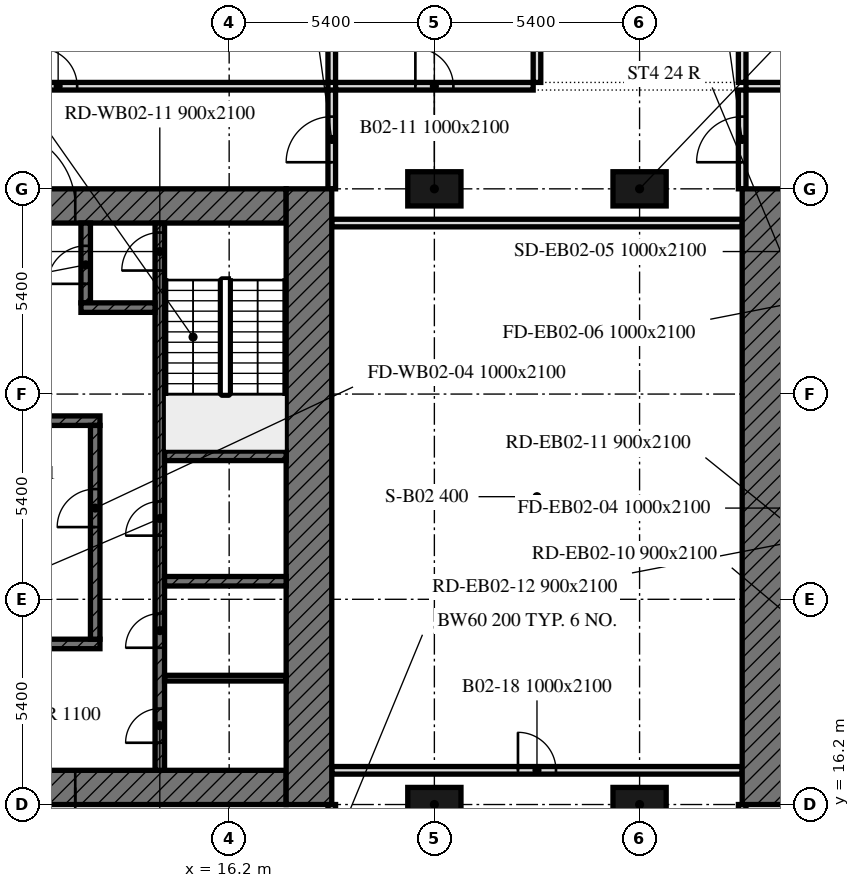
"""IFC4 building model, lengths in metres.
Left out: names, types, materials, properties, quantities, classifications, styles, units other than length and angle.
Written with IfcOpenShell. Run it as: python <this file> out.ifc"""

import sys

from ifc_helpers import new_model, si_unit, direction, frame, frame_2d, origin, origin_2d, place, context, subcontext, project, spatial, rectangle, extrude, element, fill, save


model = new_model("IFC4")
c1 = context("Model", 3, precision=1e-05, world=origin(), true_north=direction((0.0, 1.0)))
c2 = subcontext(c1, "Body", "Model", "MODEL_VIEW")
j1 = project(units=[si_unit("LENGTHUNIT", "METRE"), si_unit("PLANEANGLEUNIT", "RADIAN")], contexts=[c1])
p1 = place(None, origin())
s1 = spatial("IfcSite", under=j1, at=p1, CompositionType="ELEMENT")
p2 = place(p1, origin())
s2 = spatial("IfcBuilding", under=s1, at=p2, CompositionType="ELEMENT")
p3 = place(p2, frame((0.0, 0.0, -9.0)))
s3 = spatial("IfcBuildingStorey", under=s2, at=p3, CompositionType="ELEMENT", Elevation=-9.0)
for number, where, z_axis, x_axis in (
    (1, (21.6, 16.2, 0.0), (0.0, 0.0, 1.0), (1.0, 0.0, 0.0)),
    (2, (27.0, 16.2, 0.0), (0.0, 0.0, 1.0), (1.0, 0.0, 0.0)),
    (3, (21.6, 32.4, 0.0), (0.0, 0.0, 1.0), (1.0, 0.0, 0.0)),
    (4, (27.0, 32.4, 0.0), (0.0, 0.0, 1.0), (1.0, 0.0, 0.0)),
):
    element("IfcColumn", number, at=place(p3, frame(where, z_axis=z_axis, x_axis=x_axis)), inside=s3, PredefinedType="COLUMN", context=c2, shape_type="SweptSolid", body=[
        extrude(rectangle(XDim=1.4, YDim=0.9, at=origin_2d()), origin(), (0.0, 0.0, 1.0), 4.1),
    ])
for number, where, z_axis, x_axis in (
    (5, (18.9, 35.2, 0.0), (0.0, 0.0, 1.0), (0.0, 1.0, 0.0)),
    (6, (24.3, 35.2, 0.0), (0.0, 0.0, 1.0), (0.0, 1.0, 0.0)),
    (7, (29.7, 35.2, 0.0), (0.0, 0.0, 1.0), (0.0, 1.0, 0.0)),
):
    element("IfcWall", number, at=place(p3, frame(where, z_axis=z_axis, x_axis=x_axis)), inside=s3, PredefinedType="PARTITIONING", context=c2, shape_type="SweptSolid", body=[
        extrude(rectangle(XDim=8.8, YDim=0.2, at=frame_2d((4.4, 0.0))), origin(), (0.0, 0.0, 1.0), 4.1),
    ])
p4 = place(p3, frame((4.6, 35.1, 0.0), z_axis=(0.0, 0.0, 1.0), x_axis=(1.0, 0.0, 0.0)))
e8 = element("IfcWall", 8, at=p4, inside=s3, PredefinedType="PARTITIONING", context=c2, shape_type="SweptSolid", body=[
    extrude(rectangle(XDim=14.2, YDim=0.2, at=frame_2d((7.1, 0.0))), origin(), (0.0, 0.0, 1.0), 4.1),
])
p5 = place(p4, frame((6.6, 0.0, 0.0)))
e9 = element("IfcOpeningElement", 9, at=p5, cuts=e8, PredefinedType="OPENING", context=c2, shape_type="SweptSolid", body=[
    extrude(rectangle(XDim=1.0, YDim=2.1, at=frame_2d((0.5, 1.05))), frame((0.0, 0.11, 0.0), z_axis=(0.0, -1.0, 0.0), x_axis=(1.0, 0.0, 0.0)), (0.0, 0.0, 1.0), 0.22),
])
p6 = place(p3, frame((19.0, 35.1, 0.0), z_axis=(0.0, 0.0, 1.0), x_axis=(1.0, 0.0, 0.0)))
e10 = element("IfcWall", 10, at=p6, inside=s3, PredefinedType="PARTITIONING", context=c2, shape_type="SweptSolid", body=[
    extrude(rectangle(XDim=5.2, YDim=0.2, at=frame_2d((2.6, 0.0))), origin(), (0.0, 0.0, 1.0), 4.1),
])
p7 = place(p6, frame((2.1, 0.0, 0.0)))
e11 = element("IfcOpeningElement", 11, at=p7, cuts=e10, PredefinedType="OPENING", context=c2, shape_type="SweptSolid", body=[
    extrude(rectangle(XDim=1.0, YDim=2.1, at=frame_2d((0.5, 1.05))), frame((0.0, 0.11, 0.0), z_axis=(0.0, -1.0, 0.0), x_axis=(1.0, 0.0, 0.0)), (0.0, 0.0, 1.0), 0.22),
])
p8 = place(p3, frame((29.8, 35.1, 0.0), z_axis=(0.0, 0.0, 1.0), x_axis=(1.0, 0.0, 0.0)))
e12 = element("IfcWall", 12, at=p8, inside=s3, PredefinedType="PARTITIONING", context=c2, shape_type="SweptSolid", body=[
    extrude(rectangle(XDim=5.2, YDim=0.2, at=frame_2d((2.6, 0.0))), origin(), (0.0, 0.0, 1.0), 4.1),
])
p9 = place(p8, frame((2.1, 0.0, 0.0)))
e13 = element("IfcOpeningElement", 13, at=p9, cuts=e12, PredefinedType="OPENING", context=c2, shape_type="SweptSolid", body=[
    extrude(rectangle(XDim=1.0, YDim=2.1, at=frame_2d((0.5, 1.05))), frame((0.0, 0.11, 0.0), z_axis=(0.0, -1.0, 0.0), x_axis=(1.0, 0.0, 0.0)), (0.0, 0.0, 1.0), 0.22),
])
p10 = place(p3, frame((18.9, 13.6, 0.0), z_axis=(0.0, 0.0, 1.0), x_axis=(0.0, 1.0, 0.0)))
e14 = element("IfcWall", 14, at=p10, inside=s3, PredefinedType="PARTITIONING", context=c2, shape_type="SweptSolid", body=[
    extrude(rectangle(XDim=2.6, YDim=0.2, at=frame_2d((1.3, 0.0))), origin(), (0.0, 0.0, 1.0), 4.1),
])
p11 = place(p10, frame((0.7, 0.0, 0.0)))
e15 = element("IfcOpeningElement", 15, at=p11, cuts=e14, PredefinedType="OPENING", context=c2, shape_type="SweptSolid", body=[
    extrude(rectangle(XDim=1.2, YDim=2.1, at=frame_2d((0.6, 1.05))), frame((0.0, 0.11, 0.0), z_axis=(0.0, -1.0, 0.0), x_axis=(1.0, 0.0, 0.0)), (0.0, 0.0, 1.0), 0.22),
])
p12 = place(p3, frame((18.9, 32.4, 0.0), z_axis=(0.0, 0.0, 1.0), x_axis=(0.0, 1.0, 0.0)))
e16 = element("IfcWall", 16, at=p12, inside=s3, PredefinedType="PARTITIONING", context=c2, shape_type="SweptSolid", body=[
    extrude(rectangle(XDim=2.6, YDim=0.2, at=frame_2d((1.3, 0.0))), origin(), (0.0, 0.0, 1.0), 4.1),
])
p13 = place(p12, frame((0.7, 0.0, 0.0)))
e17 = element("IfcOpeningElement", 17, at=p13, cuts=e16, PredefinedType="OPENING", context=c2, shape_type="SweptSolid", body=[
    extrude(rectangle(XDim=1.2, YDim=2.1, at=frame_2d((0.6, 1.05))), frame((0.0, 0.11, 0.0), z_axis=(0.0, -1.0, 0.0), x_axis=(1.0, 0.0, 0.0)), (0.0, 0.0, 1.0), 0.22),
])
p14 = place(p3, frame((29.7, 13.6, 0.0), z_axis=(0.0, 0.0, 1.0), x_axis=(0.0, 1.0, 0.0)))
e18 = element("IfcWall", 18, at=p14, inside=s3, PredefinedType="PARTITIONING", context=c2, shape_type="SweptSolid", body=[
    extrude(rectangle(XDim=2.6, YDim=0.2, at=frame_2d((1.3, 0.0))), origin(), (0.0, 0.0, 1.0), 4.1),
])
p15 = place(p14, frame((0.7, 0.0, 0.0)))
e19 = element("IfcOpeningElement", 19, at=p15, cuts=e18, PredefinedType="OPENING", context=c2, shape_type="SweptSolid", body=[
    extrude(rectangle(XDim=1.2, YDim=2.1, at=frame_2d((0.6, 1.05))), frame((0.0, 0.11, 0.0), z_axis=(0.0, -1.0, 0.0), x_axis=(1.0, 0.0, 0.0)), (0.0, 0.0, 1.0), 0.22),
])
p16 = place(p3, frame((29.7, 32.4, 0.0), z_axis=(0.0, 0.0, 1.0), x_axis=(0.0, 1.0, 0.0)))
e20 = element("IfcWall", 20, at=p16, inside=s3, PredefinedType="PARTITIONING", context=c2, shape_type="SweptSolid", body=[
    extrude(rectangle(XDim=2.6, YDim=0.2, at=frame_2d((1.3, 0.0))), origin(), (0.0, 0.0, 1.0), 4.1),
])
p17 = place(p16, frame((0.7, 0.0, 0.0)))
e21 = element("IfcOpeningElement", 21, at=p17, cuts=e20, PredefinedType="OPENING", context=c2, shape_type="SweptSolid", body=[
    extrude(rectangle(XDim=1.2, YDim=2.1, at=frame_2d((0.6, 1.05))), frame((0.0, 0.11, 0.0), z_axis=(0.0, -1.0, 0.0), x_axis=(1.0, 0.0, 0.0)), (0.0, 0.0, 1.0), 0.22),
])
p18 = place(p3, frame((18.9, 17.1, 0.0), z_axis=(0.0, 0.0, 1.0), x_axis=(1.0, 0.0, 0.0)))
e22 = element("IfcWall", 22, at=p18, inside=s3, PredefinedType="PARTITIONING", context=c2, shape_type="SweptSolid", body=[
    extrude(rectangle(XDim=10.8, YDim=0.2, at=frame_2d((5.4, 0.0))), origin(), (0.0, 0.0, 1.0), 4.1),
])
p19 = place(p18, frame((4.9, 0.0, 0.0)))
e23 = element("IfcOpeningElement", 23, at=p19, cuts=e22, PredefinedType="OPENING", context=c2, shape_type="SweptSolid", body=[
    extrude(rectangle(XDim=1.0, YDim=2.1, at=frame_2d((0.5, 1.05))), frame((0.0, 0.11, 0.0), z_axis=(0.0, -1.0, 0.0), x_axis=(1.0, 0.0, 0.0)), (0.0, 0.0, 1.0), 0.22),
])
p20 = place(p3, frame((18.9, 31.5, 0.0), z_axis=(0.0, 0.0, 1.0), x_axis=(1.0, 0.0, 0.0)))
e24 = element("IfcWall", 24, at=p20, inside=s3, PredefinedType="PARTITIONING", context=c2, shape_type="SweptSolid", body=[
    extrude(rectangle(XDim=10.8, YDim=0.2, at=frame_2d((5.4, 0.0))), origin(), (0.0, 0.0, 1.0), 4.1),
])
p21 = place(p3, frame((17.7, 16.65, 0.0), z_axis=(0.0, 0.0, 1.0), x_axis=(-1.0, 0.0, 0.0)))
e25 = element("IfcWall", 25, at=p21, inside=s3, PredefinedType="SOLIDWALL", context=c2, shape_type="SweptSolid", body=[
    extrude(rectangle(XDim=11.1, YDim=0.9, at=frame_2d((5.55, 0.0))), origin(), (0.0, 0.0, 1.0), 4.1),
])
p22 = place(p21, frame((5.55, 0.0, 0.0)))
e26 = element("IfcOpeningElement", 26, at=p22, cuts=e25, PredefinedType="OPENING", context=c2, shape_type="SweptSolid", body=[
    extrude(rectangle(XDim=2.0, YDim=2.4, at=frame_2d((1.0, 1.2))), frame((0.0, 0.45, 0.0), z_axis=(0.0, -1.0, 0.0), x_axis=(1.0, 0.0, 0.0)), (0.0, 0.0, 1.0), 0.9),
])
p23 = place(p3, frame((6.6, 31.95, 0.0), z_axis=(0.0, 0.0, 1.0), x_axis=(1.0, 0.0, 0.0)))
e27 = element("IfcWall", 27, at=p23, inside=s3, PredefinedType="SOLIDWALL", context=c2, shape_type="SweptSolid", body=[
    extrude(rectangle(XDim=11.1, YDim=0.9, at=frame_2d((5.55, 0.0))), origin(), (0.0, 0.0, 1.0), 4.1),
])
p24 = place(p23, frame((3.55, 0.0, 0.0)))
e28 = element("IfcOpeningElement", 28, at=p24, cuts=e27, PredefinedType="OPENING", context=c2, shape_type="SweptSolid", body=[
    extrude(rectangle(XDim=2.0, YDim=2.4, at=frame_2d((1.0, 1.2))), frame((0.0, 0.45, 0.0), z_axis=(0.0, -1.0, 0.0), x_axis=(1.0, 0.0, 0.0)), (0.0, 0.0, 1.0), 0.9),
])
p25 = place(p3, frame((18.3, 32.4, 0.0), z_axis=(0.0, 0.0, 1.0), x_axis=(0.0, -1.0, 0.0)))
e29 = element("IfcWall", 29, at=p25, inside=s3, PredefinedType="SOLIDWALL", context=c2, shape_type="SweptSolid", body=[
    extrude(rectangle(XDim=16.2, YDim=1.2, at=frame_2d((8.1, 0.0))), origin(), (0.0, 0.0, 1.0), 4.1),
])
p26 = place(p3, frame((14.375, 17.1, 0.0), z_axis=(0.0, 0.0, 1.0), x_axis=(0.0, 1.0, 0.0)))
e30 = element("IfcWall", 30, at=p26, inside=s3, PredefinedType="SOLIDWALL", context=c2, shape_type="SweptSolid", body=[
    extrude(rectangle(XDim=14.4, YDim=0.25, at=frame_2d((7.2, 0.0))), origin(), (0.0, 0.0, 1.0), 4.1),
])
p27 = place(p26, frame((13.15, 0.0, 0.0)))
e31 = element("IfcOpeningElement", 31, at=p27, cuts=e30, PredefinedType="OPENING", context=c2, shape_type="SweptSolid", body=[
    extrude(rectangle(XDim=1.0, YDim=2.1, at=frame_2d((0.5, 1.05))), frame((0.0, 0.125, 0.0), z_axis=(0.0, -1.0, 0.0), x_axis=(1.0, 0.0, 0.0)), (0.0, 0.0, 1.0), 0.25),
])
p28 = place(p26, frame((0.725, 0.0, 0.0)))
e32 = element("IfcOpeningElement", 32, at=p28, cuts=e30, PredefinedType="OPENING", context=c2, shape_type="SweptSolid", body=[
    extrude(rectangle(XDim=0.9, YDim=2.1, at=frame_2d((0.45, 1.05))), frame((0.0, 0.125, 0.0), z_axis=(0.0, -1.0, 0.0), x_axis=(1.0, 0.0, 0.0)), (0.0, 0.0, 1.0), 0.25),
])
p29 = place(p26, frame((3.225, 0.0, 0.0)))
e33 = element("IfcOpeningElement", 33, at=p29, cuts=e30, PredefinedType="OPENING", context=c2, shape_type="SweptSolid", body=[
    extrude(rectangle(XDim=0.9, YDim=2.1, at=frame_2d((0.45, 1.05))), frame((0.0, 0.125, 0.0), z_axis=(0.0, -1.0, 0.0), x_axis=(1.0, 0.0, 0.0)), (0.0, 0.0, 1.0), 0.25),
])
p30 = place(p26, frame((6.175, 0.0, 0.0)))
e34 = element("IfcOpeningElement", 34, at=p30, cuts=e30, PredefinedType="OPENING", context=c2, shape_type="SweptSolid", body=[
    extrude(rectangle(XDim=0.9, YDim=2.1, at=frame_2d((0.45, 1.05))), frame((0.0, 0.125, 0.0), z_axis=(0.0, -1.0, 0.0), x_axis=(1.0, 0.0, 0.0)), (0.0, 0.0, 1.0), 0.25),
])
for number, where, z_axis, x_axis in (
    (35, (14.5, 25.375, 0.0), (0.0, 0.0, 1.0), (1.0, 0.0, 0.0)),
    (36, (14.5, 22.075, 0.0), (0.0, 0.0, 1.0), (1.0, 0.0, 0.0)),
):
    element("IfcWall", number, at=place(p3, frame(where, z_axis=z_axis, x_axis=x_axis)), inside=s3, PredefinedType="SOLIDWALL", context=c2, shape_type="SweptSolid", body=[
        extrude(rectangle(XDim=3.2, YDim=0.25, at=frame_2d((1.6, 0.0))), origin(), (0.0, 0.0, 1.0), 4.1),
    ])
for number, where, z_axis, x_axis in (
    (37, (10.05, 26.3, 0.0), (0.0, 0.0, 1.0), (1.0, 0.0, 0.0)),
    (38, (10.05, 20.425, 0.0), (0.0, 0.0, 1.0), (1.0, 0.0, 0.0)),
):
    element("IfcWall", number, at=place(p3, frame(where, z_axis=z_axis, x_axis=x_axis)), inside=s3, PredefinedType="SOLIDWALL", context=c2, shape_type="SweptSolid", body=[
        extrude(rectangle(XDim=2.75, YDim=0.25, at=frame_2d((1.375, 0.0))), origin(), (0.0, 0.0, 1.0), 4.1),
    ])
p31 = place(p3, frame((12.425, 29.4, 0.0), z_axis=(0.0, 0.0, 1.0), x_axis=(0.0, 1.0, 0.0)))
e39 = element("IfcWall", 39, at=p31, inside=s3, PredefinedType="SOLIDWALL", context=c2, shape_type="SweptSolid", body=[
    extrude(rectangle(XDim=2.1, YDim=0.25, at=frame_2d((1.05, 0.0))), origin(), (0.0, 0.0, 1.0), 4.1),
])
p32 = place(p31, frame((0.5, 0.0, 0.0)))
e40 = element("IfcOpeningElement", 40, at=p32, cuts=e39, PredefinedType="OPENING", context=c2, shape_type="SweptSolid", body=[
    extrude(rectangle(XDim=1.0, YDim=2.1, at=frame_2d((0.5, 1.05))), frame((0.0, 0.125, 0.0), z_axis=(0.0, -1.0, 0.0), x_axis=(1.0, 0.0, 0.0)), (0.0, 0.0, 1.0), 0.25),
])
p33 = place(p3, frame((12.3, 29.275, 0.0), z_axis=(0.0, 0.0, 1.0), x_axis=(1.0, 0.0, 0.0)))
e41 = element("IfcWall", 41, at=p33, inside=s3, PredefinedType="SOLIDWALL", context=c2, shape_type="SweptSolid", body=[
    extrude(rectangle(XDim=1.95, YDim=0.25, at=frame_2d((0.975, 0.0))), origin(), (0.0, 0.0, 1.0), 4.1),
])
p34 = place(p3, frame((12.675, 20.55, 0.0), z_axis=(0.0, 0.0, 1.0), x_axis=(0.0, 1.0, 0.0)))
e42 = element("IfcWall", 42, at=p34, inside=s3, PredefinedType="SOLIDWALL", context=c2, shape_type="SweptSolid", body=[
    extrude(rectangle(XDim=5.625, YDim=0.25, at=frame_2d((2.812, 0.0))), origin(), (0.0, 0.0, 1.0), 4.1),
])
p35 = place(p34, frame((2.95, 0.0, 0.0)))
e43 = element("IfcOpeningElement", 43, at=p35, cuts=e42, PredefinedType="OPENING", context=c2, shape_type="SweptSolid", body=[
    extrude(rectangle(XDim=1.0, YDim=2.1, at=frame_2d((0.5, 1.05))), frame((0.0, 0.125, 0.0), z_axis=(0.0, -1.0, 0.0), x_axis=(1.0, 0.0, 0.0)), (0.0, 0.0, 1.0), 0.25),
])
p36 = place(p3, frame((14.5, 19.525, 0.0), z_axis=(0.0, 0.0, 1.0), x_axis=(1.0, 0.0, 0.0)))
e44 = element("IfcWall", 44, at=p36, inside=s3, PredefinedType="PARTITIONING", context=c2, shape_type="SweptSolid", body=[
    extrude(rectangle(XDim=3.2, YDim=0.15, at=frame_2d((1.6, 0.0))), origin(), (0.0, 0.0, 1.0), 4.1),
])
p37 = place(p3, frame((30.3, 16.2, 0.0), z_axis=(0.0, 0.0, 1.0), x_axis=(0.0, 1.0, 0.0)))
e45 = element("IfcWall", 45, at=p37, inside=s3, PredefinedType="SOLIDWALL", context=c2, shape_type="SweptSolid", body=[
    extrude(rectangle(XDim=16.2, YDim=1.2, at=frame_2d((8.1, 0.0))), origin(), (0.0, 0.0, 1.0), 4.1),
])
p38 = place(p5, origin())
e46 = element("IfcDoor", 46, at=p38, inside=s3, OperationType="SINGLE_SWING_LEFT", PredefinedType="DOOR", context=c2, shape_type="SweptSolid", body=[
    extrude(rectangle(XDim=1.0, YDim=2.1, at=frame_2d((0.5, 1.05))), frame((0.0, 0.025, 0.0), z_axis=(0.0, -1.0, 0.0), x_axis=(1.0, 0.0, 0.0)), (0.0, 0.0, 1.0), 0.05),
])
fill(e9, e46)
p39 = place(p7, origin())
e47 = element("IfcDoor", 47, at=p39, inside=s3, OperationType="SINGLE_SWING_LEFT", PredefinedType="DOOR", context=c2, shape_type="SweptSolid", body=[
    extrude(rectangle(XDim=1.0, YDim=2.1, at=frame_2d((0.5, 1.05))), frame((0.0, 0.025, 0.0), z_axis=(0.0, -1.0, 0.0), x_axis=(1.0, 0.0, 0.0)), (0.0, 0.0, 1.0), 0.05),
])
fill(e11, e47)
p40 = place(p13, origin())
e48 = element("IfcDoor", 48, at=p40, inside=s3, OperationType="SINGLE_SWING_LEFT", PredefinedType="DOOR", context=c2, shape_type="SweptSolid", body=[
    extrude(rectangle(XDim=1.2, YDim=2.1, at=frame_2d((0.6, 1.05))), frame((0.0, 0.025, 0.0), z_axis=(0.0, -1.0, 0.0), x_axis=(1.0, 0.0, 0.0)), (0.0, 0.0, 1.0), 0.05),
])
fill(e17, e48)
p41 = place(p17, origin())
e49 = element("IfcDoor", 49, at=p41, inside=s3, OperationType="SINGLE_SWING_LEFT", PredefinedType="DOOR", context=c2, shape_type="SweptSolid", body=[
    extrude(rectangle(XDim=1.2, YDim=2.1, at=frame_2d((0.6, 1.05))), frame((0.0, 0.025, 0.0), z_axis=(0.0, -1.0, 0.0), x_axis=(1.0, 0.0, 0.0)), (0.0, 0.0, 1.0), 0.05),
])
fill(e21, e49)
p42 = place(p19, origin())
e50 = element("IfcDoor", 50, at=p42, inside=s3, OperationType="SINGLE_SWING_LEFT", PredefinedType="DOOR", context=c2, shape_type="SweptSolid", body=[
    extrude(rectangle(XDim=1.0, YDim=2.1, at=frame_2d((0.5, 1.05))), frame((0.0, 0.025, 0.0), z_axis=(0.0, -1.0, 0.0), x_axis=(1.0, 0.0, 0.0)), (0.0, 0.0, 1.0), 0.05),
])
fill(e23, e50)
p43 = place(p22, origin())
e51 = element("IfcDoor", 51, at=p43, inside=s3, OperationType="DOUBLE_DOOR_SINGLE_SWING", PredefinedType="DOOR", context=c2, shape_type="SweptSolid", body=[
    extrude(rectangle(XDim=2.0, YDim=2.4, at=frame_2d((1.0, 1.2))), frame((0.0, 0.025, 0.0), z_axis=(0.0, -1.0, 0.0), x_axis=(1.0, 0.0, 0.0)), (0.0, 0.0, 1.0), 0.05),
])
fill(e26, e51)
p44 = place(p24, origin())
e52 = element("IfcDoor", 52, at=p44, inside=s3, OperationType="DOUBLE_DOOR_SINGLE_SWING", PredefinedType="DOOR", context=c2, shape_type="SweptSolid", body=[
    extrude(rectangle(XDim=2.0, YDim=2.4, at=frame_2d((1.0, 1.2))), frame((0.0, 0.025, 0.0), z_axis=(0.0, -1.0, 0.0), x_axis=(1.0, 0.0, 0.0)), (0.0, 0.0, 1.0), 0.05),
])
fill(e28, e52)
p45 = place(p35, origin())
e53 = element("IfcDoor", 53, at=p45, inside=s3, OperationType="SINGLE_SWING_LEFT", PredefinedType="DOOR", context=c2, shape_type="SweptSolid", body=[
    extrude(rectangle(XDim=1.0, YDim=2.1, at=frame_2d((0.5, 1.05))), frame((0.0, 0.025, 0.0), z_axis=(0.0, -1.0, 0.0), x_axis=(1.0, 0.0, 0.0)), (0.0, 0.0, 1.0), 0.05),
])
fill(e43, e53)
p46 = place(p27, origin())
e54 = element("IfcDoor", 54, at=p46, inside=s3, OperationType="SINGLE_SWING_LEFT", PredefinedType="DOOR", context=c2, shape_type="SweptSolid", body=[
    extrude(rectangle(XDim=1.0, YDim=2.1, at=frame_2d((0.5, 1.05))), frame((0.0, 0.025, 0.0), z_axis=(0.0, -1.0, 0.0), x_axis=(1.0, 0.0, 0.0)), (0.0, 0.0, 1.0), 0.05),
])
fill(e31, e54)
p47 = place(p32, origin())
e55 = element("IfcDoor", 55, at=p47, inside=s3, OperationType="SINGLE_SWING_LEFT", PredefinedType="DOOR", context=c2, shape_type="SweptSolid", body=[
    extrude(rectangle(XDim=1.0, YDim=2.1, at=frame_2d((0.5, 1.05))), frame((0.0, 0.025, 0.0), z_axis=(0.0, -1.0, 0.0), x_axis=(1.0, 0.0, 0.0)), (0.0, 0.0, 1.0), 0.05),
])
fill(e40, e55)
p48 = place(p28, origin())
e56 = element("IfcDoor", 56, at=p48, inside=s3, OperationType="SINGLE_SWING_LEFT", PredefinedType="DOOR", context=c2, shape_type="SweptSolid", body=[
    extrude(rectangle(XDim=0.9, YDim=2.1, at=frame_2d((0.45, 1.05))), frame((0.0, 0.025, 0.0), z_axis=(0.0, -1.0, 0.0), x_axis=(1.0, 0.0, 0.0)), (0.0, 0.0, 1.0), 0.05),
])
fill(e32, e56)
p49 = place(p29, origin())
e57 = element("IfcDoor", 57, at=p49, inside=s3, OperationType="SINGLE_SWING_LEFT", PredefinedType="DOOR", context=c2, shape_type="SweptSolid", body=[
    extrude(rectangle(XDim=0.9, YDim=2.1, at=frame_2d((0.45, 1.05))), frame((0.0, 0.025, 0.0), z_axis=(0.0, -1.0, 0.0), x_axis=(1.0, 0.0, 0.0)), (0.0, 0.0, 1.0), 0.05),
])
fill(e33, e57)
p50 = place(p30, origin())
e58 = element("IfcDoor", 58, at=p50, inside=s3, OperationType="SINGLE_SWING_LEFT", PredefinedType="DOOR", context=c2, shape_type="SweptSolid", body=[
    extrude(rectangle(XDim=0.9, YDim=2.1, at=frame_2d((0.45, 1.05))), frame((0.0, 0.025, 0.0), z_axis=(0.0, -1.0, 0.0), x_axis=(1.0, 0.0, 0.0)), (0.0, 0.0, 1.0), 0.05),
])
fill(e34, e58)
save(model, sys.argv[1])
